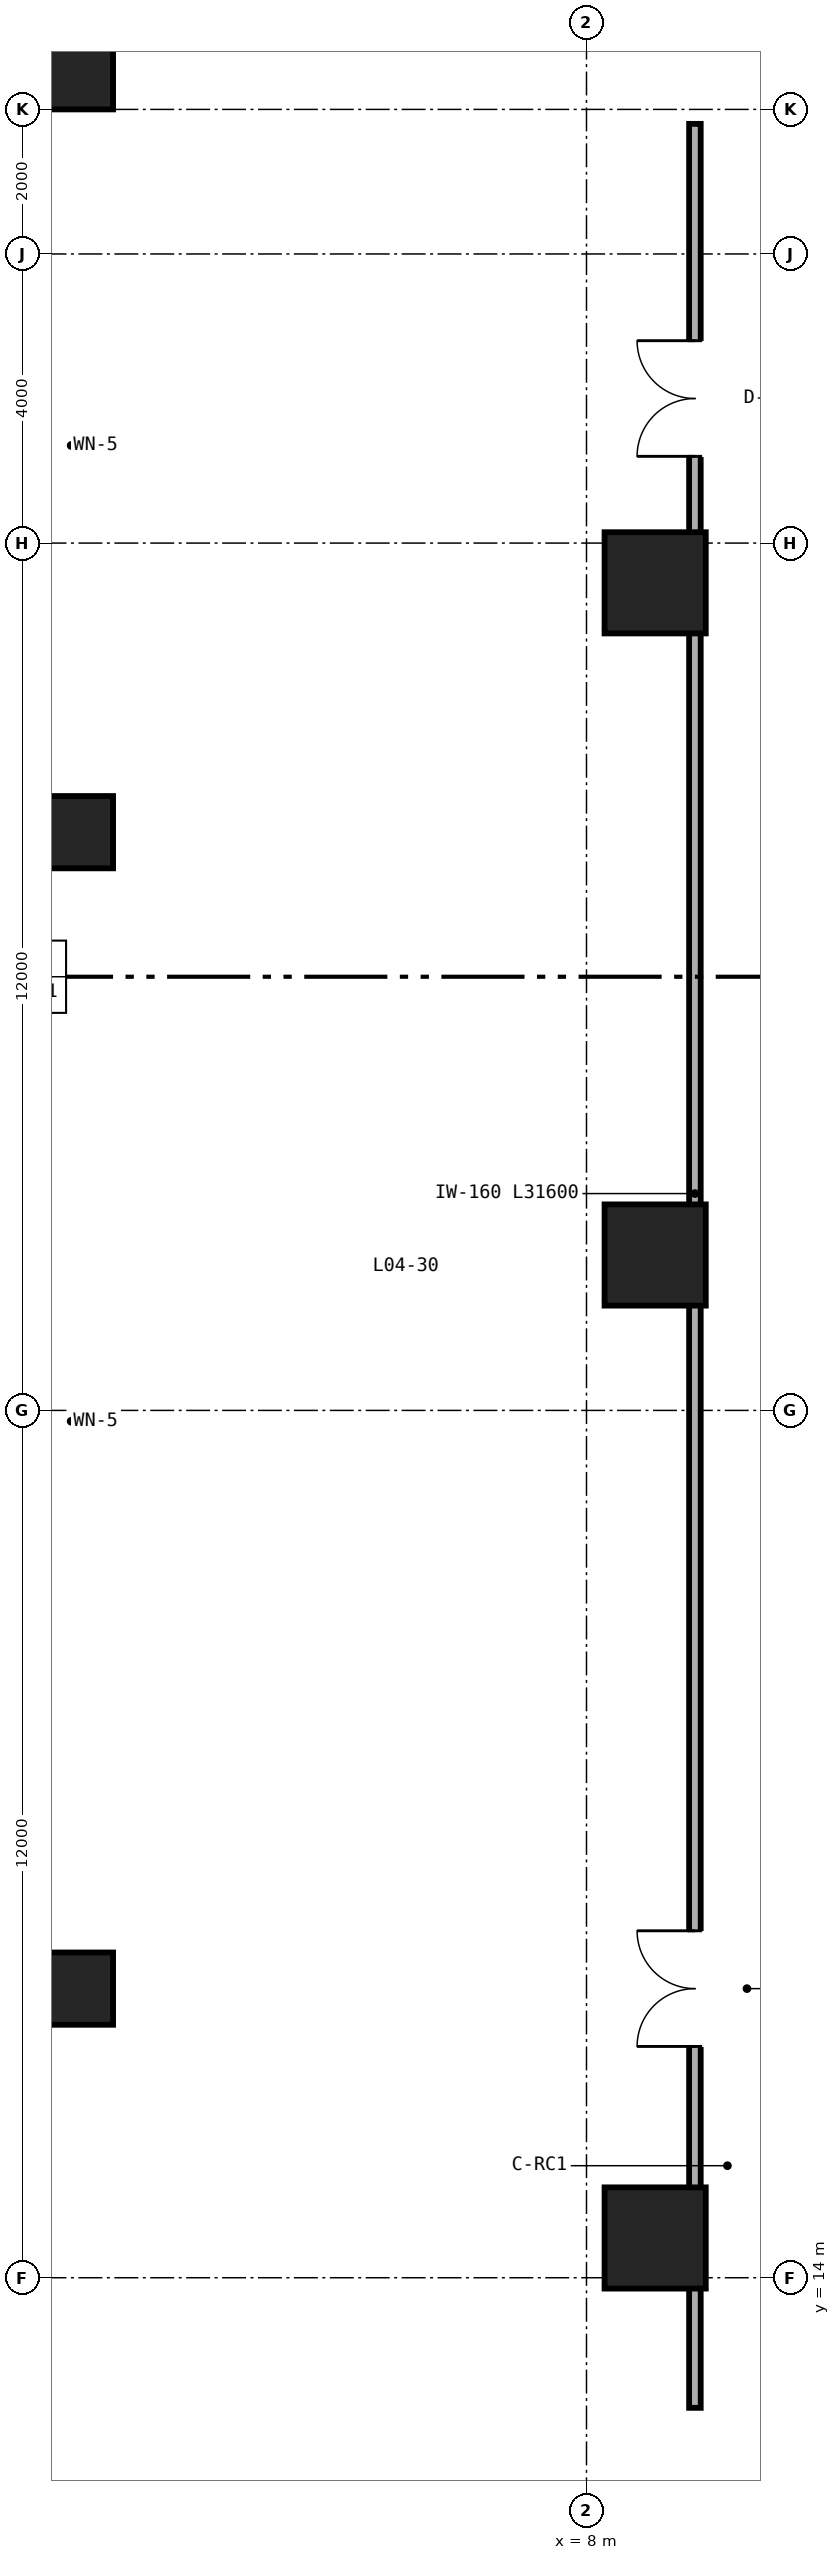
"""IFC4 building model, lengths in metres.
Left out: names, types, materials, properties, quantities, classifications, styles, units other than length and angle.
Written with IfcOpenShell. Run it as: python <this file> out.ifc"""

import sys

from ifc_helpers import new_model, si_unit, direction, frame, frame_2d, origin, origin_2d, place, context, subcontext, project, spatial, rectangle, extrude, source, transform, mapped, element, fill, save


model = new_model("IFC4")
c1 = context("Model", 3, precision=1e-05, world=origin(), true_north=direction((0.0, 1.0)))
c2 = subcontext(c1, "Body", "Model", "MODEL_VIEW")
j1 = project(units=[si_unit("LENGTHUNIT", "METRE"), si_unit("PLANEANGLEUNIT", "RADIAN")], contexts=[c1])
p1 = place(None, origin())
s1 = spatial("IfcSite", under=j1, at=p1, CompositionType="ELEMENT")
p2 = place(p1, origin())
s2 = spatial("IfcBuilding", under=s1, at=p2, CompositionType="ELEMENT")
p3 = place(p2, frame((0.0, 0.0, 19.2)))
s3 = spatial("IfcBuildingStorey", under=s2, at=p3, CompositionType="ELEMENT", Elevation=19.2)
m1 = source(origin(), c2, "Body", "SweptSolid", [
    extrude(rectangle(XDim=1.0, YDim=1.0, at=origin_2d()), origin(), (0.0, 0.0, 1.0), 4.48),
])
for number, where, z_axis, x_axis in (
    (1, (0.95, 18.0, 0.0), (0.0, 0.0, 1.0), (1.0, 0.0, 0.0)),
    (2, (0.95, 34.0, 0.0), (0.0, 0.0, 1.0), (1.0, 0.0, 0.0)),
    (3, (0.95, 44.5, 0.0), (0.0, 0.0, 1.0), (1.0, 0.0, 0.0)),
):
    element("IfcColumn", number, at=place(p3, frame(where, z_axis=z_axis, x_axis=x_axis)), inside=s3, PredefinedType="COLUMN", context=c2, shape_type="MappedRepresentation", body=[
        mapped(m1, transform((0.0, 0.0, 0.0), scale=1.0)),
    ])
m2 = source(origin(), c2, "Body", "SweptSolid", [
    extrude(rectangle(XDim=1.4, YDim=1.4, at=origin_2d()), origin(), (0.0, 0.0, 1.0), 4.48),
])
for number, where, z_axis, x_axis in (
    (4, (8.95, 14.55, 0.0), (0.0, 0.0, 1.0), (1.0, 0.0, 0.0)),
    (5, (8.95, 28.15, 0.0), (0.0, 0.0, 1.0), (1.0, 0.0, 0.0)),
    (6, (8.95, 37.45, 0.0), (0.0, 0.0, 1.0), (1.0, 0.0, 0.0)),
):
    element("IfcColumn", number, at=place(p3, frame(where, z_axis=z_axis, x_axis=x_axis)), inside=s3, PredefinedType="COLUMN", context=c2, shape_type="MappedRepresentation", body=[
        mapped(m2, transform((0.0, 0.0, 0.0), scale=1.0)),
    ])
p4 = place(p3, frame((9.5, 12.2, 0.0), z_axis=(0.0, 0.0, 1.0), x_axis=(0.0, 1.0, 0.0)))
e7 = element("IfcWall", 7, at=p4, inside=s3, PredefinedType="PARTITIONING", context=c2, shape_type="SweptSolid", body=[
    extrude(rectangle(XDim=31.6, YDim=0.16, at=frame_2d((15.8, 0.0))), origin(), (0.0, 0.0, 1.0), 3.553),
])
p5 = place(p4, frame((5.0, 0.0, 0.0)))
e8 = element("IfcOpeningElement", 8, at=p5, cuts=e7, PredefinedType="OPENING", context=c2, shape_type="SweptSolid", body=[
    extrude(rectangle(XDim=1.6, YDim=2.3, at=frame_2d((0.8, 1.15))), frame((0.0, 0.09, 0.0), z_axis=(0.0, -1.0, 0.0), x_axis=(1.0, 0.0, 0.0)), (0.0, 0.0, 1.0), 0.18),
])
p6 = place(p4, frame((27.0, 0.0, 0.0)))
e9 = element("IfcOpeningElement", 9, at=p6, cuts=e7, PredefinedType="OPENING", context=c2, shape_type="SweptSolid", body=[
    extrude(rectangle(XDim=1.6, YDim=2.3, at=frame_2d((0.8, 1.15))), frame((0.0, 0.09, 0.0), z_axis=(0.0, -1.0, 0.0), x_axis=(1.0, 0.0, 0.0)), (0.0, 0.0, 1.0), 0.18),
])
m3 = source(origin(), c2, "Body", "SweptSolid", [
    extrude(rectangle(XDim=1.6, YDim=2.3, at=frame_2d((0.8, 1.15))), frame((0.0, 0.025, 0.0), z_axis=(0.0, -1.0, 0.0), x_axis=(1.0, 0.0, 0.0)), (0.0, 0.0, 1.0), 0.05),
])
p7 = place(p5, origin())
e10 = element("IfcDoor", 10, at=p7, inside=s3, OperationType="DOUBLE_DOOR_SINGLE_SWING", PredefinedType="DOOR", context=c2, shape_type="MappedRepresentation", body=[
    mapped(m3, transform((0.0, 0.0, 0.0), scale=1.0)),
])
fill(e8, e10)
p8 = place(p6, origin())
e11 = element("IfcDoor", 11, at=p8, inside=s3, OperationType="DOUBLE_DOOR_SINGLE_SWING", PredefinedType="DOOR", context=c2, shape_type="MappedRepresentation", body=[
    mapped(m3, transform((0.0, 0.0, 0.0), scale=1.0)),
])
fill(e9, e11)
save(model, sys.argv[1])
